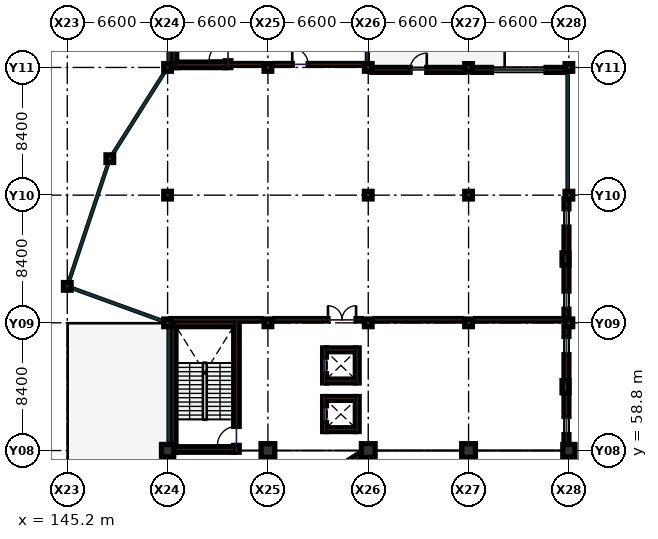
"""IFC4 building model, lengths in metres.
Left out: names, types, materials, properties, quantities, classifications, styles, units other than length and angle.
Written with IfcOpenShell. Run it as: python <this file> out.ifc"""

import sys

from ifc_helpers import new_model, si_unit, direction, frame, frame_2d, origin, origin_2d, place, context, subcontext, project, spatial, rectangle, extrude, element, fill, save


model = new_model("IFC4")
c1 = context("Model", 3, precision=1e-05, world=origin(), true_north=direction((0.0, 1.0)))
c2 = subcontext(c1, "Body", "Model", "MODEL_VIEW")
j1 = project(units=[si_unit("LENGTHUNIT", "METRE"), si_unit("PLANEANGLEUNIT", "RADIAN")], contexts=[c1])
p1 = place(None, origin())
s1 = spatial("IfcSite", under=j1, at=p1, CompositionType="ELEMENT")
p2 = place(p1, origin())
s2 = spatial("IfcBuilding", under=s1, at=p2, CompositionType="ELEMENT")
p3 = place(p2, frame((0.0, 0.0, 5.4)))
s3 = spatial("IfcBuildingStorey", under=s2, at=p3, CompositionType="ELEMENT", Elevation=5.4)
p4 = place(p3, frame((151.8, 58.8, 0.0), z_axis=(0.0, 0.0, 1.0), x_axis=(1.0, 0.0, 0.0)))
e1 = element("IfcColumn", 1, at=p4, inside=s3, PredefinedType="COLUMN", context=c2, shape_type="SweptSolid", body=[
    extrude(rectangle(XDim=0.8, YDim=0.8, at=origin_2d()), origin(), (0.0, 0.0, 1.0), 4.5),
])
for number, where, z_axis, x_axis in (
    (2, (151.8, 67.2, 0.0), (0.0, 0.0, 1.0), (1.0, 0.0, 0.0)),
    (3, (151.8, 75.6, 0.0), (0.0, 0.0, 1.0), (1.0, 0.0, 0.0)),
    (4, (151.8, 84.0, 0.0), (0.0, 0.0, 1.0), (1.0, 0.0, 0.0)),
):
    element("IfcColumn", number, at=place(p3, frame(where, z_axis=z_axis, x_axis=x_axis)), inside=s3, PredefinedType="COLUMN", context=c2, shape_type="SweptSolid", body=[
        extrude(rectangle(XDim=0.5, YDim=0.5, at=origin_2d()), origin(), (0.0, 0.0, 1.0), 4.5),
    ])
p5 = place(p3, frame((158.4, 58.8, 0.0), z_axis=(0.0, 0.0, 1.0), x_axis=(1.0, 0.0, 0.0)))
e5 = element("IfcColumn", 5, at=p5, inside=s3, PredefinedType="COLUMN", context=c2, shape_type="SweptSolid", body=[
    extrude(rectangle(XDim=0.9, YDim=0.9, at=origin_2d()), origin(), (0.0, 0.0, 1.0), 4.5),
])
for number, where, z_axis, x_axis in (
    (6, (158.4, 67.2, 0.0), (0.0, 0.0, 1.0), (1.0, 0.0, 0.0)),
    (7, (158.4, 84.0, 0.0), (0.0, 0.0, 1.0), (1.0, 0.0, 0.0)),
):
    element("IfcColumn", number, at=place(p3, frame(where, z_axis=z_axis, x_axis=x_axis)), inside=s3, PredefinedType="COLUMN", context=c2, shape_type="SweptSolid", body=[
        extrude(rectangle(XDim=0.5, YDim=0.5, at=origin_2d()), origin(), (0.0, 0.0, 1.0), 4.5),
    ])
p6 = place(p3, frame((165.0, 58.8, 0.0), z_axis=(0.0, 0.0, 1.0), x_axis=(1.0, 0.0, 0.0)))
e8 = element("IfcColumn", 8, at=p6, inside=s3, PredefinedType="COLUMN", context=c2, shape_type="SweptSolid", body=[
    extrude(rectangle(XDim=0.9, YDim=0.9, at=origin_2d()), origin(), (0.0, 0.0, 1.0), 4.5),
])
for number, where, z_axis, x_axis in (
    (9, (165.0, 67.2, 0.0), (0.0, 0.0, 1.0), (1.0, 0.0, 0.0)),
    (10, (165.0, 75.6, 0.0), (0.0, 0.0, 1.0), (1.0, 0.0, 0.0)),
    (11, (165.0, 84.0, 0.0), (0.0, 0.0, 1.0), (1.0, 0.0, 0.0)),
):
    element("IfcColumn", number, at=place(p3, frame(where, z_axis=z_axis, x_axis=x_axis)), inside=s3, PredefinedType="COLUMN", context=c2, shape_type="SweptSolid", body=[
        extrude(rectangle(XDim=0.5, YDim=0.5, at=origin_2d()), origin(), (0.0, 0.0, 1.0), 4.5),
    ])
p7 = place(p3, frame((171.6, 58.8, 0.0), z_axis=(0.0, 0.0, 1.0), x_axis=(1.0, 0.0, 0.0)))
e12 = element("IfcColumn", 12, at=p7, inside=s3, PredefinedType="COLUMN", context=c2, shape_type="SweptSolid", body=[
    extrude(rectangle(XDim=0.9, YDim=0.9, at=origin_2d()), origin(), (0.0, 0.0, 1.0), 4.5),
])
for number, where, z_axis, x_axis in (
    (13, (171.6, 67.2, 0.0), (0.0, 0.0, 1.0), (1.0, 0.0, 0.0)),
    (14, (171.6, 75.6, 0.0), (0.0, 0.0, 1.0), (1.0, 0.0, 0.0)),
    (15, (171.6, 84.0, 0.0), (0.0, 0.0, 1.0), (1.0, 0.0, 0.0)),
):
    element("IfcColumn", number, at=place(p3, frame(where, z_axis=z_axis, x_axis=x_axis)), inside=s3, PredefinedType="COLUMN", context=c2, shape_type="SweptSolid", body=[
        extrude(rectangle(XDim=0.5, YDim=0.5, at=origin_2d()), origin(), (0.0, 0.0, 1.0), 4.5),
    ])
p8 = place(p3, frame((178.2, 58.8, 0.0), z_axis=(0.0, 0.0, 1.0), x_axis=(1.0, 0.0, 0.0)))
e16 = element("IfcColumn", 16, at=p8, inside=s3, PredefinedType="COLUMN", context=c2, shape_type="SweptSolid", body=[
    extrude(rectangle(XDim=0.8, YDim=0.8, at=origin_2d()), origin(), (0.0, 0.0, 1.0), 4.5),
])
for number, where, z_axis, x_axis in (
    (17, (178.2, 67.2, 0.0), (0.0, 0.0, 1.0), (1.0, 0.0, 0.0)),
    (18, (178.2, 75.6, 0.0), (0.0, 0.0, 1.0), (1.0, 0.0, 0.0)),
    (19, (178.2, 84.0, 0.0), (0.0, 0.0, 1.0), (1.0, 0.0, 0.0)),
    (20, (145.2, 69.6, 0.0), (0.0, 0.0, 1.0), (1.0, 0.0, 0.0)),
    (21, (148.0, 78.0, 0.0), (0.0, 0.0, 1.0), (1.0, 0.0, 0.0)),
):
    element("IfcColumn", number, at=place(p3, frame(where, z_axis=z_axis, x_axis=x_axis)), inside=s3, PredefinedType="COLUMN", context=c2, shape_type="SweptSolid", body=[
        extrude(rectangle(XDim=0.5, YDim=0.5, at=origin_2d()), origin(), (0.0, 0.0, 1.0), 4.5),
    ])
for number, where, z_axis, x_axis in (
    (22, (177.975, 63.0, 0.0), (0.0, 0.0, 1.0), (1.0, 0.0, 0.0)),
    (23, (177.975, 71.4, 0.0), (0.0, 0.0, 1.0), (1.0, 0.0, 0.0)),
):
    element("IfcColumn", number, at=place(p3, frame(where, z_axis=z_axis, x_axis=x_axis)), inside=s3, PredefinedType="PILASTER", context=c2, shape_type="SweptSolid", body=[
        extrude(rectangle(XDim=0.45, YDim=0.8, at=origin_2d()), origin(), (0.0, 0.0, 1.0), 4.5),
    ])
p9 = place(p3, frame((152.0, 67.4, 0.0), z_axis=(0.0, 0.0, 1.0), x_axis=(1.0, 0.0, 0.0)))
e24 = element("IfcWall", 24, at=p9, inside=s3, PredefinedType="PARTITIONING", context=c2, shape_type="SweptSolid", body=[
    extrude(rectangle(XDim=5.95, YDim=0.16, at=frame_2d((2.975, 0.0))), origin(), (0.0, 0.0, 1.0), 3.45),
])
p10 = place(p3, frame((158.85, 67.4, 0.0), z_axis=(0.0, 0.0, 1.0), x_axis=(1.0, 0.0, 0.0)))
e25 = element("IfcWall", 25, at=p10, inside=s3, PredefinedType="PARTITIONING", context=c2, shape_type="SweptSolid", body=[
    extrude(rectangle(XDim=5.7, YDim=0.16, at=frame_2d((2.85, 0.0))), origin(), (0.0, 0.0, 1.0), 3.45),
])
p11 = place(p10, frame((3.5, 0.0, 0.0)))
e26 = element("IfcOpeningElement", 26, at=p11, cuts=e25, PredefinedType="OPENING", context=c2, shape_type="SweptSolid", body=[
    extrude(rectangle(XDim=1.85, YDim=2.25, at=frame_2d((0.925, 1.125))), frame((0.0, 0.09, 0.0), z_axis=(0.0, -1.0, 0.0), x_axis=(1.0, 0.0, 0.0)), (0.0, 0.0, 1.0), 0.18),
])
p12 = place(p3, frame((165.45, 67.4, 0.0), z_axis=(0.0, 0.0, 1.0), x_axis=(1.0, 0.0, 0.0)))
e27 = element("IfcWall", 27, at=p12, inside=s3, PredefinedType="PARTITIONING", context=c2, shape_type="SweptSolid", body=[
    extrude(rectangle(XDim=5.7, YDim=0.16, at=frame_2d((2.85, 0.0))), origin(), (0.0, 0.0, 1.0), 3.45),
])
p13 = place(p3, frame((172.05, 67.4, 0.0), z_axis=(0.0, 0.0, 1.0), x_axis=(1.0, 0.0, 0.0)))
e28 = element("IfcWall", 28, at=p13, inside=s3, PredefinedType="PARTITIONING", context=c2, shape_type="SweptSolid", body=[
    extrude(rectangle(XDim=5.83, YDim=0.16, at=frame_2d((2.915, 0.0))), origin(), (0.0, 0.0, 1.0), 3.45),
])
p14 = place(p3, frame((155.8, 84.2, 0.0), z_axis=(0.0, 0.0, 1.0), x_axis=(1.0, 0.0, 0.0)))
e29 = element("IfcWall", 29, at=p14, inside=s3, PredefinedType="PARTITIONING", context=c2, shape_type="SweptSolid", body=[
    extrude(rectangle(XDim=2.15, YDim=0.12, at=frame_2d((1.075, 0.0))), origin(), (0.0, 0.0, 1.0), 3.45),
])
p15 = place(p3, frame((158.85, 84.2, 0.0), z_axis=(0.0, 0.0, 1.0), x_axis=(1.0, 0.0, 0.0)))
e30 = element("IfcWall", 30, at=p15, inside=s3, PredefinedType="PARTITIONING", context=c2, shape_type="SweptSolid", body=[
    extrude(rectangle(XDim=5.83, YDim=0.12, at=frame_2d((2.915, 0.0))), origin(), (0.0, 0.0, 1.0), 3.45),
])
p16 = place(p15, frame((1.15, 0.0, 0.0)))
e31 = element("IfcOpeningElement", 31, at=p16, cuts=e30, PredefinedType="OPENING", context=c2, shape_type="SweptSolid", body=[
    extrude(rectangle(XDim=1.05, YDim=2.15, at=frame_2d((0.525, 1.075))), frame((0.0, 0.07, 0.0), z_axis=(0.0, -1.0, 0.0), x_axis=(1.0, 0.0, 0.0)), (0.0, 0.0, 1.0), 0.14),
])
p17 = place(p3, frame((165.3, 50.85, 0.0), z_axis=(0.0, 0.0, 1.0), x_axis=(0.0, 1.0, 0.0)))
e32 = element("IfcWall", 32, at=p17, inside=s3, PredefinedType="PARTITIONING", context=c2, shape_type="SweptSolid", body=[
    extrude(rectangle(XDim=7.65, YDim=0.12, at=frame_2d((3.825, 0.0))), origin(), (0.0, 0.0, 1.0), 3.45),
])
p18 = place(p17, frame((4.4, 0.0, 0.0)))
e33 = element("IfcOpeningElement", 33, at=p18, cuts=e32, PredefinedType="OPENING", context=c2, shape_type="SweptSolid", body=[
    extrude(rectangle(XDim=0.95, YDim=2.15, at=frame_2d((0.475, 1.075))), frame((0.0, 0.07, 0.0), z_axis=(0.0, -1.0, 0.0), x_axis=(1.0, 0.0, 0.0)), (0.0, 0.0, 1.0), 0.14),
])
p19 = place(p3, frame((171.355, 83.84, 0.0), z_axis=(0.0, 0.0, 1.0), x_axis=(-1.0, 0.0, 0.0)))
e34 = element("IfcWall", 34, at=p19, inside=s3, PredefinedType="SOLIDWALL", context=c2, shape_type="SweptSolid", body=[
    extrude(rectangle(XDim=6.11, YDim=0.32, at=frame_2d((3.055, 0.0))), origin(), (0.0, 0.0, 1.0), 3.585),
])
p20 = place(p19, frame((2.505, 0.0, 0.0)))
e35 = element("IfcOpeningElement", 35, at=p20, cuts=e34, PredefinedType="OPENING", context=c2, shape_type="SweptSolid", body=[
    extrude(rectangle(XDim=1.1, YDim=2.2, at=frame_2d((0.55, 1.1))), frame((0.0, 0.17, 0.0), z_axis=(0.0, -1.0, 0.0), x_axis=(1.0, 0.0, 0.0)), (0.0, 0.0, 1.0), 0.34),
])
p21 = place(p3, frame((178.04, 50.795, 0.0), z_axis=(0.0, 0.0, 1.0), x_axis=(0.0, 1.0, 0.0)))
e36 = element("IfcWall", 36, at=p21, inside=s3, PredefinedType="SOLIDWALL", context=c2, shape_type="SweptSolid", body=[
    extrude(rectangle(XDim=7.61, YDim=0.32, at=frame_2d((3.805, 0.0))), origin(), (0.0, 0.0, 1.0), 3.485),
])
p22 = place(p21, frame((2.255, 0.0, 0.95)))
e37 = element("IfcOpeningElement", 37, at=p22, cuts=e36, PredefinedType="OPENING", context=c2, shape_type="SweptSolid", body=[
    extrude(rectangle(XDim=3.1, YDim=2.05, at=frame_2d((1.55, 1.025))), frame((0.0, 0.17, 0.0), z_axis=(0.0, -1.0, 0.0), x_axis=(1.0, 0.0, 0.0)), (0.0, 0.0, 1.0), 0.34),
])
p23 = place(p3, frame((178.04, 59.195, 0.0), z_axis=(0.0, 0.0, 1.0), x_axis=(0.0, 1.0, 0.0)))
e38 = element("IfcWall", 38, at=p23, inside=s3, PredefinedType="SOLIDWALL", context=c2, shape_type="SweptSolid", body=[
    extrude(rectangle(XDim=7.76, YDim=0.32, at=frame_2d((3.88, 0.0))), origin(), (0.0, 0.0, 1.0), 3.635),
])
p24 = place(p23, frame((0.65, 0.0, 0.95)))
e39 = element("IfcOpeningElement", 39, at=p24, cuts=e38, PredefinedType="OPENING", context=c2, shape_type="SweptSolid", body=[
    extrude(rectangle(XDim=1.2, YDim=1.5, at=frame_2d((0.6, 0.75))), frame((0.0, 0.17, 0.0), z_axis=(0.0, -1.0, 0.0), x_axis=(1.0, 0.0, 0.0)), (0.0, 0.0, 1.0), 0.34),
])
p25 = place(p23, frame((5.91, 0.0, 0.95)))
e40 = element("IfcOpeningElement", 40, at=p25, cuts=e38, PredefinedType="OPENING", context=c2, shape_type="SweptSolid", body=[
    extrude(rectangle(XDim=1.2, YDim=1.5, at=frame_2d((0.6, 0.75))), frame((0.0, 0.17, 0.0), z_axis=(0.0, -1.0, 0.0), x_axis=(1.0, 0.0, 0.0)), (0.0, 0.0, 1.0), 0.34),
])
p26 = place(p3, frame((178.04, 67.445, 0.0), z_axis=(0.0, 0.0, 1.0), x_axis=(0.0, 1.0, 0.0)))
e41 = element("IfcWall", 41, at=p26, inside=s3, PredefinedType="SOLIDWALL", context=c2, shape_type="SweptSolid", body=[
    extrude(rectangle(XDim=7.91, YDim=0.32, at=frame_2d((3.955, 0.0))), origin(), (0.0, 0.0, 1.0), 3.485),
])
p27 = place(p26, frame((0.65, 0.0, 0.95)))
e42 = element("IfcOpeningElement", 42, at=p27, cuts=e41, PredefinedType="OPENING", context=c2, shape_type="SweptSolid", body=[
    extrude(rectangle(XDim=1.2, YDim=1.5, at=frame_2d((0.6, 0.75))), frame((0.0, 0.17, 0.0), z_axis=(0.0, -1.0, 0.0), x_axis=(1.0, 0.0, 0.0)), (0.0, 0.0, 1.0), 0.34),
])
p28 = place(p26, frame((6.06, 0.0, 0.95)))
e43 = element("IfcOpeningElement", 43, at=p28, cuts=e41, PredefinedType="OPENING", context=c2, shape_type="SweptSolid", body=[
    extrude(rectangle(XDim=1.2, YDim=1.5, at=frame_2d((0.6, 0.75))), frame((0.0, 0.17, 0.0), z_axis=(0.0, -1.0, 0.0), x_axis=(1.0, 0.0, 0.0)), (0.0, 0.0, 1.0), 0.34),
])
p29 = place(p3, frame((177.955, 83.84, 0.0), z_axis=(0.0, 0.0, 1.0), x_axis=(-1.0, 0.0, 0.0)))
e44 = element("IfcWall", 44, at=p29, inside=s3, PredefinedType="SOLIDWALL", context=c2, shape_type="SweptSolid", body=[
    extrude(rectangle(XDim=6.11, YDim=0.32, at=frame_2d((3.055, 0.0))), origin(), (0.0, 0.0, 1.0), 3.585),
])
p30 = place(p29, frame((1.255, 0.0, 0.95)))
e45 = element("IfcOpeningElement", 45, at=p30, cuts=e44, PredefinedType="OPENING", context=c2, shape_type="SweptSolid", body=[
    extrude(rectangle(XDim=3.6, YDim=2.0, at=frame_2d((1.8, 1.0))), frame((0.0, 0.17, 0.0), z_axis=(0.0, -1.0, 0.0), x_axis=(1.0, 0.0, 0.0)), (0.0, 0.0, 1.0), 0.34),
])
p31 = place(p3, frame((158.65, 54.76, 0.0), z_axis=(0.0, 0.0, 1.0), x_axis=(0.843786613851, 0.536678814829, 0.0)))
e46 = element("IfcWall", 46, at=p31, inside=s3, PredefinedType="SHEAR", context=c2, shape_type="SweptSolid", body=[
    extrude(rectangle(XDim=7.229, YDim=0.34, at=frame_2d((3.615, 0.0))), origin(), (0.0, 0.0, 1.0), 4.2),
])
p32 = place(p3, frame((152.17, 58.69, 0.0), z_axis=(0.0, 0.0, 1.0), x_axis=(0.0, 1.0, 0.0)))
e47 = element("IfcWall", 47, at=p32, inside=s3, PredefinedType="SHEAR", context=c2, shape_type="SweptSolid", body=[
    extrude(rectangle(XDim=8.62, YDim=0.36, at=frame_2d((4.31, 0.0))), origin(), (0.0, 0.0, 1.0), 4.2),
])
p33 = place(p3, frame((156.33, 58.69, 0.0), z_axis=(0.0, 0.0, 1.0), x_axis=(0.0, 1.0, 0.0)))
e48 = element("IfcWall", 48, at=p33, inside=s3, PredefinedType="SHEAR", context=c2, shape_type="SweptSolid", body=[
    extrude(rectangle(XDim=8.62, YDim=0.36, at=frame_2d((4.31, 0.0))), origin(), (0.0, 0.0, 1.0), 4.2),
])
p34 = place(p33, frame((0.45, 0.0, 0.0)))
e49 = element("IfcOpeningElement", 49, at=p34, cuts=e48, PredefinedType="OPENING", context=c2, shape_type="SweptSolid", body=[
    extrude(rectangle(XDim=1.25, YDim=2.15, at=frame_2d((0.625, 1.075))), frame((0.0, 0.19, 0.0), z_axis=(0.0, -1.0, 0.0), x_axis=(1.0, 0.0, 0.0)), (0.0, 0.0, 1.0), 0.38),
])
for number, where, z_axis, x_axis in (
    (50, (152.35, 67.13, 0.0), (0.0, 0.0, 1.0), (1.0, 0.0, 0.0)),
    (51, (152.35, 58.87, 0.0), (0.0, 0.0, 1.0), (1.0, 0.0, 0.0)),
):
    element("IfcWall", number, at=place(p3, frame(where, z_axis=z_axis, x_axis=x_axis)), inside=s3, PredefinedType="SHEAR", context=c2, shape_type="SweptSolid", body=[
        extrude(rectangle(XDim=3.8, YDim=0.36, at=frame_2d((1.9, 0.0))), origin(), (0.0, 0.0, 1.0), 4.2),
    ])
p35 = place(p3, frame((152.22, 83.99, 0.0), z_axis=(0.0, 0.0, 1.0), x_axis=(0.0, 1.0, 0.0)))
e52 = element("IfcWall", 52, at=p35, inside=s3, PredefinedType="SHEAR", context=c2, shape_type="SweptSolid", body=[
    extrude(rectangle(XDim=8.17, YDim=0.36, at=frame_2d((4.085, 0.0))), origin(), (0.0, 0.0, 1.0), 4.2),
])
p36 = place(p3, frame((155.78, 83.99, 0.0), z_axis=(0.0, 0.0, 1.0), x_axis=(0.0, 1.0, 0.0)))
e53 = element("IfcWall", 53, at=p36, inside=s3, PredefinedType="SHEAR", context=c2, shape_type="SweptSolid", body=[
    extrude(rectangle(XDim=8.17, YDim=0.36, at=frame_2d((4.085, 0.0))), origin(), (0.0, 0.0, 1.0), 4.2),
])
p37 = place(p36, frame((0.45, 0.0, 0.0)))
e54 = element("IfcOpeningElement", 54, at=p37, cuts=e53, PredefinedType="OPENING", context=c2, shape_type="SweptSolid", body=[
    extrude(rectangle(XDim=1.25, YDim=2.15, at=frame_2d((0.625, 1.075))), frame((0.0, 0.19, 0.0), z_axis=(0.0, -1.0, 0.0), x_axis=(1.0, 0.0, 0.0)), (0.0, 0.0, 1.0), 0.38),
])
p38 = place(p3, frame((152.4, 84.17, 0.0), z_axis=(0.0, 0.0, 1.0), x_axis=(1.0, 0.0, 0.0)))
e55 = element("IfcWall", 55, at=p38, inside=s3, PredefinedType="SHEAR", context=c2, shape_type="SweptSolid", body=[
    extrude(rectangle(XDim=3.2, YDim=0.36, at=frame_2d((1.6, 0.0))), origin(), (0.0, 0.0, 1.0), 4.2),
])
p39 = place(p3, frame((162.125, 60.05, 0.0), z_axis=(0.0, 0.0, 1.0), x_axis=(0.0, 1.0, 0.0)))
e56 = element("IfcWall", 56, at=p39, inside=s3, PredefinedType="SHEAR", context=c2, shape_type="SweptSolid", body=[
    extrude(rectangle(XDim=2.3, YDim=0.25, at=frame_2d((1.15, 0.0))), origin(), (0.0, 0.0, 1.0), 4.2),
])
p40 = place(p39, frame((0.6, 0.0, 0.0)))
e57 = element("IfcOpeningElement", 57, at=p40, cuts=e56, PredefinedType="OPENING", context=c2, shape_type="SweptSolid", body=[
    extrude(rectangle(XDim=1.1, YDim=2.15, at=frame_2d((0.55, 1.075))), frame((0.0, 0.135, 0.0), z_axis=(0.0, -1.0, 0.0), x_axis=(1.0, 0.0, 0.0)), (0.0, 0.0, 1.0), 0.27),
])
p41 = place(p3, frame((164.275, 60.05, 0.0), z_axis=(0.0, 0.0, 1.0), x_axis=(0.0, 1.0, 0.0)))
e58 = element("IfcWall", 58, at=p41, inside=s3, PredefinedType="SHEAR", context=c2, shape_type="SweptSolid", body=[
    extrude(rectangle(XDim=2.3, YDim=0.25, at=frame_2d((1.15, 0.0))), origin(), (0.0, 0.0, 1.0), 4.2),
])
for number, where, z_axis, x_axis in (
    (59, (162.25, 60.175, 0.0), (0.0, 0.0, 1.0), (1.0, 0.0, 0.0)),
    (60, (162.25, 62.225, 0.0), (0.0, 0.0, 1.0), (1.0, 0.0, 0.0)),
):
    element("IfcWall", number, at=place(p3, frame(where, z_axis=z_axis, x_axis=x_axis)), inside=s3, PredefinedType="SHEAR", context=c2, shape_type="SweptSolid", body=[
        extrude(rectangle(XDim=1.9, YDim=0.25, at=frame_2d((0.95, 0.0))), origin(), (0.0, 0.0, 1.0), 4.2),
    ])
p42 = place(p3, frame((162.125, 63.25, 0.0), z_axis=(0.0, 0.0, 1.0), x_axis=(0.0, 1.0, 0.0)))
e61 = element("IfcWall", 61, at=p42, inside=s3, PredefinedType="SHEAR", context=c2, shape_type="SweptSolid", body=[
    extrude(rectangle(XDim=2.3, YDim=0.25, at=frame_2d((1.15, 0.0))), origin(), (0.0, 0.0, 1.0), 4.2),
])
p43 = place(p42, frame((0.6, 0.0, 0.0)))
e62 = element("IfcOpeningElement", 62, at=p43, cuts=e61, PredefinedType="OPENING", context=c2, shape_type="SweptSolid", body=[
    extrude(rectangle(XDim=1.1, YDim=2.15, at=frame_2d((0.55, 1.075))), frame((0.0, 0.135, 0.0), z_axis=(0.0, -1.0, 0.0), x_axis=(1.0, 0.0, 0.0)), (0.0, 0.0, 1.0), 0.27),
])
p44 = place(p3, frame((164.275, 63.25, 0.0), z_axis=(0.0, 0.0, 1.0), x_axis=(0.0, 1.0, 0.0)))
e63 = element("IfcWall", 63, at=p44, inside=s3, PredefinedType="SHEAR", context=c2, shape_type="SweptSolid", body=[
    extrude(rectangle(XDim=2.3, YDim=0.25, at=frame_2d((1.15, 0.0))), origin(), (0.0, 0.0, 1.0), 4.2),
])
for number, where, z_axis, x_axis in (
    (64, (162.25, 63.375, 0.0), (0.0, 0.0, 1.0), (1.0, 0.0, 0.0)),
    (65, (162.25, 65.425, 0.0), (0.0, 0.0, 1.0), (1.0, 0.0, 0.0)),
):
    element("IfcWall", number, at=place(p3, frame(where, z_axis=z_axis, x_axis=x_axis)), inside=s3, PredefinedType="SHEAR", context=c2, shape_type="SweptSolid", body=[
        extrude(rectangle(XDim=1.9, YDim=0.25, at=frame_2d((0.95, 0.0))), origin(), (0.0, 0.0, 1.0), 4.2),
    ])
p45 = place(p11, origin())
e66 = element("IfcDoor", 66, at=p45, inside=s3, OperationType="DOUBLE_DOOR_SINGLE_SWING", PredefinedType="DOOR", context=c2, shape_type="SweptSolid", body=[
    extrude(rectangle(XDim=1.85, YDim=2.25, at=frame_2d((0.925, 1.125))), frame((0.0, 0.025, 0.0), z_axis=(0.0, -1.0, 0.0), x_axis=(1.0, 0.0, 0.0)), (0.0, 0.0, 1.0), 0.05),
])
fill(e26, e66)
p46 = place(p16, origin())
e67 = element("IfcDoor", 67, at=p46, inside=s3, OperationType="SINGLE_SWING_LEFT", PredefinedType="DOOR", context=c2, shape_type="SweptSolid", body=[
    extrude(rectangle(XDim=1.05, YDim=2.15, at=frame_2d((0.525, 1.075))), frame((0.0, 0.025, 0.0), z_axis=(0.0, -1.0, 0.0), x_axis=(1.0, 0.0, 0.0)), (0.0, 0.0, 1.0), 0.05),
])
fill(e31, e67)
p47 = place(p20, frame((1.1, 0.0, 0.0), z_axis=(0.0, 0.0, 1.0), x_axis=(-1.0, 0.0, 0.0)))
e68 = element("IfcDoor", 68, at=p47, inside=s3, OperationType="SINGLE_SWING_LEFT", PredefinedType="DOOR", context=c2, shape_type="SweptSolid", body=[
    extrude(rectangle(XDim=1.1, YDim=2.2, at=frame_2d((0.55, 1.1))), frame((0.0, 0.025, 0.0), z_axis=(0.0, -1.0, 0.0), x_axis=(1.0, 0.0, 0.0)), (0.0, 0.0, 1.0), 0.05),
])
fill(e35, e68)
p48 = place(p24, origin())
e69 = element("IfcWindow", 69, at=p48, inside=s3, PartitioningType="SINGLE_PANEL", PredefinedType="WINDOW", context=c2, shape_type="SweptSolid", body=[
    extrude(rectangle(XDim=1.2, YDim=1.5, at=frame_2d((0.6, 0.75))), frame((0.0, 0.03, 0.0), z_axis=(0.0, -1.0, 0.0), x_axis=(1.0, 0.0, 0.0)), (0.0, 0.0, 1.0), 0.06),
])
fill(e39, e69)
p49 = place(p25, origin())
e70 = element("IfcWindow", 70, at=p49, inside=s3, PartitioningType="SINGLE_PANEL", PredefinedType="WINDOW", context=c2, shape_type="SweptSolid", body=[
    extrude(rectangle(XDim=1.2, YDim=1.5, at=frame_2d((0.6, 0.75))), frame((0.0, 0.03, 0.0), z_axis=(0.0, -1.0, 0.0), x_axis=(1.0, 0.0, 0.0)), (0.0, 0.0, 1.0), 0.06),
])
fill(e40, e70)
p50 = place(p27, origin())
e71 = element("IfcWindow", 71, at=p50, inside=s3, PartitioningType="SINGLE_PANEL", PredefinedType="WINDOW", context=c2, shape_type="SweptSolid", body=[
    extrude(rectangle(XDim=1.2, YDim=1.5, at=frame_2d((0.6, 0.75))), frame((0.0, 0.03, 0.0), z_axis=(0.0, -1.0, 0.0), x_axis=(1.0, 0.0, 0.0)), (0.0, 0.0, 1.0), 0.06),
])
fill(e42, e71)
p51 = place(p28, origin())
e72 = element("IfcWindow", 72, at=p51, inside=s3, PartitioningType="SINGLE_PANEL", PredefinedType="WINDOW", context=c2, shape_type="SweptSolid", body=[
    extrude(rectangle(XDim=1.2, YDim=1.5, at=frame_2d((0.6, 0.75))), frame((0.0, 0.03, 0.0), z_axis=(0.0, -1.0, 0.0), x_axis=(1.0, 0.0, 0.0)), (0.0, 0.0, 1.0), 0.06),
])
fill(e43, e72)
p52 = place(p30, origin())
e73 = element("IfcWindow", 73, at=p52, inside=s3, PartitioningType="SINGLE_PANEL", PredefinedType="WINDOW", context=c2, shape_type="SweptSolid", body=[
    extrude(rectangle(XDim=3.6, YDim=2.0, at=frame_2d((1.8, 1.0))), frame((0.0, 0.03, 0.0), z_axis=(0.0, -1.0, 0.0), x_axis=(1.0, 0.0, 0.0)), (0.0, 0.0, 1.0), 0.06),
])
fill(e45, e73)
p53 = place(p34, origin())
e74 = element("IfcDoor", 74, at=p53, inside=s3, OperationType="SINGLE_SWING_LEFT", PredefinedType="DOOR", context=c2, shape_type="SweptSolid", body=[
    extrude(rectangle(XDim=1.25, YDim=2.15, at=frame_2d((0.625, 1.075))), frame((0.0, 0.025, 0.0), z_axis=(0.0, -1.0, 0.0), x_axis=(1.0, 0.0, 0.0)), (0.0, 0.0, 1.0), 0.05),
])
fill(e49, e74)
p54 = place(p37, origin())
e75 = element("IfcDoor", 75, at=p54, inside=s3, OperationType="SINGLE_SWING_LEFT", PredefinedType="DOOR", context=c2, shape_type="SweptSolid", body=[
    extrude(rectangle(XDim=1.25, YDim=2.15, at=frame_2d((0.625, 1.075))), frame((0.0, 0.025, 0.0), z_axis=(0.0, -1.0, 0.0), x_axis=(1.0, 0.0, 0.0)), (0.0, 0.0, 1.0), 0.05),
])
fill(e54, e75)
p55 = place(p40, origin())
e76 = element("IfcDoor", 76, at=p55, inside=s3, OperationType="SLIDING_TO_LEFT", PredefinedType="DOOR", context=c2, shape_type="SweptSolid", body=[
    extrude(rectangle(XDim=1.1, YDim=2.15, at=frame_2d((0.55, 1.075))), frame((0.0, 0.025, 0.0), z_axis=(0.0, -1.0, 0.0), x_axis=(1.0, 0.0, 0.0)), (0.0, 0.0, 1.0), 0.05),
])
fill(e57, e76)
p56 = place(p43, origin())
e77 = element("IfcDoor", 77, at=p56, inside=s3, OperationType="SLIDING_TO_LEFT", PredefinedType="DOOR", context=c2, shape_type="SweptSolid", body=[
    extrude(rectangle(XDim=1.1, YDim=2.15, at=frame_2d((0.55, 1.075))), frame((0.0, 0.025, 0.0), z_axis=(0.0, -1.0, 0.0), x_axis=(1.0, 0.0, 0.0)), (0.0, 0.0, 1.0), 0.05),
])
fill(e62, e77)
save(model, sys.argv[1])
